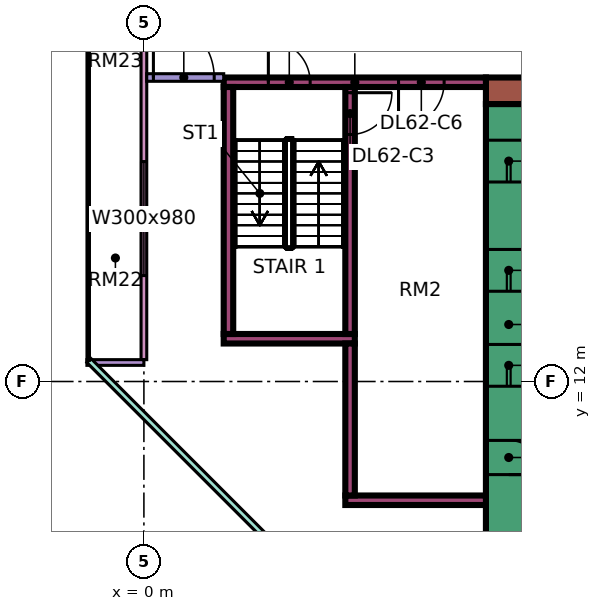
"""IFC4 building model, lengths in metres.
Left out: names, types, materials, properties, quantities, classifications, styles, units other than length and angle.
Written with IfcOpenShell. Run it as: python <this file> out.ifc"""

import sys

from ifc_helpers import new_model, si_unit, direction, frame, frame_2d, origin, place, context, subcontext, project, spatial, rectangle, extrude, element, fill, save


model = new_model("IFC4")
c1 = context("Model", 3, precision=1e-05, world=origin(), true_north=direction((0.0, 1.0)))
c2 = subcontext(c1, "Body", "Model", "MODEL_VIEW")
j1 = project(units=[si_unit("LENGTHUNIT", "METRE"), si_unit("PLANEANGLEUNIT", "RADIAN")], contexts=[c1])
p1 = place(None, origin())
s1 = spatial("IfcSite", under=j1, at=p1, CompositionType="ELEMENT")
p2 = place(p1, origin())
s2 = spatial("IfcBuilding", under=s1, at=p2, CompositionType="ELEMENT")
p3 = place(p2, frame((0.0, 0.0, 262.15)))
s3 = spatial("IfcBuildingStorey", under=s2, at=p3, CompositionType="ELEMENT", Elevation=262.15)
p4 = place(p3, frame((9.0, 19.65, 0.0), z_axis=(0.0, 0.0, 1.0), x_axis=(1.0, 0.0, 0.0)))
e1 = element("IfcWall", 1, at=p4, inside=s3, PredefinedType="SHEAR", context=c2, shape_type="SweptSolid", body=[
    extrude(rectangle(XDim=25.0, YDim=0.7, at=frame_2d((12.5, 0.0))), origin(), (0.0, 0.0, 1.0), 11.25),
])
p5 = place(p4, frame((19.1, 0.0, 0.0)))
e2 = element("IfcOpeningElement", 2, at=p5, cuts=e1, PredefinedType="OPENING", context=c2, shape_type="SweptSolid", body=[
    extrude(rectangle(XDim=1.8, YDim=2.4, at=frame_2d((0.9, 1.2))), frame((0.0, 0.36, 0.0), z_axis=(0.0, -1.0, 0.0), x_axis=(1.0, 0.0, 0.0)), (0.0, 0.0, 1.0), 0.72),
])
p6 = place(p3, frame((9.6, 7.7, 0.0), z_axis=(0.0, 0.0, 1.0), x_axis=(0.0, 1.0, 0.0)))
e3 = element("IfcWall", 3, at=p6, inside=s3, PredefinedType="SHEAR", context=c2, shape_type="SweptSolid", body=[
    extrude(rectangle(XDim=11.6, YDim=1.2, at=frame_2d((5.8, 0.0))), origin(), (0.0, 0.0, 1.0), 11.25),
])
p7 = place(p6, frame((4.175, 0.0, 0.0)))
e4 = element("IfcOpeningElement", 4, at=p7, cuts=e3, PredefinedType="OPENING", context=c2, shape_type="SweptSolid", body=[
    extrude(rectangle(XDim=1.1, YDim=2.2, at=frame_2d((0.55, 1.1))), frame((0.0, 0.61, 0.0), z_axis=(0.0, -1.0, 0.0), x_axis=(1.0, 0.0, 0.0)), (0.0, 0.0, 1.0), 1.22),
])
p8 = place(p6, frame((6.675, 0.0, 0.0)))
e5 = element("IfcOpeningElement", 5, at=p8, cuts=e3, PredefinedType="OPENING", context=c2, shape_type="SweptSolid", body=[
    extrude(rectangle(XDim=1.1, YDim=2.2, at=frame_2d((0.55, 1.1))), frame((0.0, 0.61, 0.0), z_axis=(0.0, -1.0, 0.0), x_axis=(1.0, 0.0, 0.0)), (0.0, 0.0, 1.0), 1.22),
])
p9 = place(p6, frame((9.55, 0.0, 0.0)))
e6 = element("IfcOpeningElement", 6, at=p9, cuts=e3, PredefinedType="OPENING", context=c2, shape_type="SweptSolid", body=[
    extrude(rectangle(XDim=1.1, YDim=2.2, at=frame_2d((0.55, 1.1))), frame((0.0, 0.61, 0.0), z_axis=(0.0, -1.0, 0.0), x_axis=(1.0, 0.0, 0.0)), (0.0, 0.0, 1.0), 1.22),
])
p10 = place(p6, frame((1.85, 0.0, 0.0)))
e7 = element("IfcOpeningElement", 7, at=p10, cuts=e3, PredefinedType="OPENING", context=c2, shape_type="SweptSolid", body=[
    extrude(rectangle(XDim=0.9, YDim=2.1, at=frame_2d((0.45, 1.05))), frame((0.0, 0.61, 0.0), z_axis=(0.0, -1.0, 0.0), x_axis=(1.0, 0.0, 0.0)), (0.0, 0.0, 1.0), 1.22),
])
p11 = place(p3, frame((2.1, 19.875, 0.0), z_axis=(0.0, 0.0, 1.0), x_axis=(1.0, 0.0, 0.0)))
e8 = element("IfcWall", 8, at=p11, inside=s3, PredefinedType="SHEAR", context=c2, shape_type="SweptSolid", body=[
    extrude(rectangle(XDim=6.9, YDim=0.25, at=frame_2d((3.45, 0.0))), origin(), (0.0, 0.0, 1.0), 11.25),
])
p12 = place(p11, frame((1.175, 0.0, 0.0)))
e9 = element("IfcOpeningElement", 9, at=p12, cuts=e8, PredefinedType="OPENING", context=c2, shape_type="SweptSolid", body=[
    extrude(rectangle(XDim=1.1, YDim=2.2, at=frame_2d((0.55, 1.1))), frame((0.0, 0.135, 0.0), z_axis=(0.0, -1.0, 0.0), x_axis=(1.0, 0.0, 0.0)), (0.0, 0.0, 1.0), 0.27),
])
p13 = place(p11, frame((4.6, 0.0, 0.0)))
e10 = element("IfcOpeningElement", 10, at=p13, cuts=e8, PredefinedType="OPENING", context=c2, shape_type="SweptSolid", body=[
    extrude(rectangle(XDim=1.2, YDim=2.2, at=frame_2d((0.6, 1.1))), frame((0.0, 0.135, 0.0), z_axis=(0.0, -1.0, 0.0), x_axis=(1.0, 0.0, 0.0)), (0.0, 0.0, 1.0), 0.27),
])
p14 = place(p3, frame((2.1, 13.125, 0.0), z_axis=(0.0, 0.0, 1.0), x_axis=(1.0, 0.0, 0.0)))
e11 = element("IfcWall", 11, at=p14, inside=s3, PredefinedType="SHEAR", context=c2, shape_type="SweptSolid", body=[
    extrude(rectangle(XDim=3.45, YDim=0.25, at=frame_2d((1.725, 0.0))), origin(), (0.0, 0.0, 1.0), 11.25),
])
p15 = place(p3, frame((2.225, 13.25, 0.0), z_axis=(0.0, 0.0, 1.0), x_axis=(0.0, 1.0, 0.0)))
e12 = element("IfcWall", 12, at=p15, inside=s3, PredefinedType="SHEAR", context=c2, shape_type="SweptSolid", body=[
    extrude(rectangle(XDim=6.5, YDim=0.25, at=frame_2d((3.25, 0.0))), origin(), (0.0, 0.0, 1.0), 11.25),
])
p16 = place(p3, frame((5.425, 13.25, 0.0), z_axis=(0.0, 0.0, 1.0), x_axis=(0.0, 1.0, 0.0)))
e13 = element("IfcWall", 13, at=p16, inside=s3, PredefinedType="SHEAR", context=c2, shape_type="SweptSolid", body=[
    extrude(rectangle(XDim=6.5, YDim=0.25, at=frame_2d((3.25, 0.0))), origin(), (0.0, 0.0, 1.0), 11.25),
])
p17 = place(p16, frame((5.25, 0.0, 0.0)))
e14 = element("IfcOpeningElement", 14, at=p17, cuts=e13, PredefinedType="OPENING", context=c2, shape_type="SweptSolid", body=[
    extrude(rectangle(XDim=1.1, YDim=2.2, at=frame_2d((0.55, 1.1))), frame((0.0, 0.135, 0.0), z_axis=(0.0, -1.0, 0.0), x_axis=(1.0, 0.0, 0.0)), (0.0, 0.0, 1.0), 0.27),
])
p18 = place(p3, frame((5.3, 8.875, 0.0), z_axis=(0.0, 0.0, 1.0), x_axis=(1.0, 0.0, 0.0)))
e15 = element("IfcWall", 15, at=p18, inside=s3, PredefinedType="SHEAR", context=c2, shape_type="SweptSolid", body=[
    extrude(rectangle(XDim=3.7, YDim=0.25, at=frame_2d((1.85, 0.0))), origin(), (0.0, 0.0, 1.0), 11.25),
])
p19 = place(p3, frame((5.425, 9.0, 0.0), z_axis=(0.0, 0.0, 1.0), x_axis=(0.0, 1.0, 0.0)))
e16 = element("IfcWall", 16, at=p19, inside=s3, PredefinedType="SHEAR", context=c2, shape_type="SweptSolid", body=[
    extrude(rectangle(XDim=4.0, YDim=0.25, at=frame_2d((2.0, 0.0))), origin(), (0.0, 0.0, 1.0), 11.25),
])
p20 = place(p3, frame((0.0, 23.925, 0.0), z_axis=(0.0, 0.0, 1.0), x_axis=(0.0, -1.0, 0.0)))
e17 = element("IfcWall", 17, at=p20, inside=s3, PredefinedType="SOLIDWALL", context=c2, shape_type="SweptSolid", body=[
    extrude(rectangle(XDim=11.35, YDim=0.15, at=frame_2d((5.675, 0.0))), origin(), (0.0, 0.0, 1.0), 10.85),
])
p21 = place(p20, frame((6.137, 0.0, 0.45)))
e18 = element("IfcOpeningElement", 18, at=p21, cuts=e17, PredefinedType="OPENING", context=c2, shape_type="SweptSolid", body=[
    extrude(rectangle(XDim=3.0, YDim=9.8, at=frame_2d((1.5, 4.9))), frame((0.0, 0.085, 0.0), z_axis=(0.0, -1.0, 0.0), x_axis=(1.0, 0.0, 0.0)), (0.0, 0.0, 1.0), 0.17),
])
p22 = place(p3, frame((-1.5, 12.5, 0.0), z_axis=(0.0, 0.0, 1.0), x_axis=(1.0, 0.0, 0.0)))
e19 = element("IfcWall", 19, at=p22, inside=s3, PredefinedType="SOLIDWALL", context=c2, shape_type="SweptSolid", body=[
    extrude(rectangle(XDim=1.5, YDim=0.15, at=frame_2d((0.75, 0.0))), origin(), (0.0, 0.0, 1.0), 10.85),
])
p23 = place(p3, frame((-1.447, 12.553, 0.0), z_axis=(0.0, 0.0, 1.0), x_axis=(0.707106781187, -0.707106781187, 0.0)))
e20 = element("IfcWall", 20, at=p23, inside=s3, PredefinedType="SOLIDWALL", context=c2, shape_type="SweptSolid", body=[
    extrude(rectangle(XDim=19.799, YDim=0.15, at=frame_2d((9.899, 0.0))), origin(), (0.0, 0.0, 1.0), 10.85),
])
p24 = place(p23, frame((8.399, 0.0, 0.45)))
e21 = element("IfcOpeningElement", 21, at=p24, cuts=e20, PredefinedType="OPENING", context=c2, shape_type="SweptSolid", body=[
    extrude(rectangle(XDim=3.0, YDim=9.8, at=frame_2d((1.5, 4.9))), frame((0.0, 0.085, 0.0), z_axis=(0.0, -1.0, 0.0), x_axis=(1.0, 0.0, 0.0)), (0.0, 0.0, 1.0), 0.17),
])
p25 = place(p3, frame((0.074, 20.0, 0.0), z_axis=(0.0, 0.0, 1.0), x_axis=(1.0, 0.0, 0.0)))
e22 = element("IfcWall", 22, at=p25, inside=s3, PredefinedType="PARTITIONING", context=c2, shape_type="SweptSolid", body=[
    extrude(rectangle(XDim=2.026, YDim=0.2, at=frame_2d((1.013, 0.0))), origin(), (0.0, 0.0, 1.0), 10.85),
])
p26 = place(p25, frame((0.176, 0.0, 0.0)))
e23 = element("IfcOpeningElement", 23, at=p26, cuts=e22, PredefinedType="OPENING", context=c2, shape_type="SweptSolid", body=[
    extrude(rectangle(XDim=1.6, YDim=2.1, at=frame_2d((0.8, 1.05))), frame((0.0, 0.11, 0.0), z_axis=(0.0, -1.0, 0.0), x_axis=(1.0, 0.0, 0.0)), (0.0, 0.0, 1.0), 0.22),
])
p27 = place(p21, origin())
e24 = element("IfcWindow", 24, at=p27, inside=s3, PartitioningType="SINGLE_PANEL", PredefinedType="WINDOW", context=c2, shape_type="SweptSolid", body=[
    extrude(rectangle(XDim=3.0, YDim=9.8, at=frame_2d((1.5, 4.9))), frame((0.0, 0.03, 0.0), z_axis=(0.0, -1.0, 0.0), x_axis=(1.0, 0.0, 0.0)), (0.0, 0.0, 1.0), 0.06),
])
fill(e18, e24)
p28 = place(p7, origin())
e25 = element("IfcDoor", 25, at=p28, inside=s3, OperationType="DOUBLE_DOOR_SLIDING", PredefinedType="DOOR", context=c2, shape_type="SweptSolid", body=[
    extrude(rectangle(XDim=1.1, YDim=2.2, at=frame_2d((0.55, 1.1))), frame((0.0, 0.025, 0.0), z_axis=(0.0, -1.0, 0.0), x_axis=(1.0, 0.0, 0.0)), (0.0, 0.0, 1.0), 0.05),
])
fill(e4, e25)
p29 = place(p8, origin())
e26 = element("IfcDoor", 26, at=p29, inside=s3, OperationType="DOUBLE_DOOR_SLIDING", PredefinedType="DOOR", context=c2, shape_type="SweptSolid", body=[
    extrude(rectangle(XDim=1.1, YDim=2.2, at=frame_2d((0.55, 1.1))), frame((0.0, 0.025, 0.0), z_axis=(0.0, -1.0, 0.0), x_axis=(1.0, 0.0, 0.0)), (0.0, 0.0, 1.0), 0.05),
])
fill(e5, e26)
p30 = place(p9, origin())
e27 = element("IfcDoor", 27, at=p30, inside=s3, OperationType="DOUBLE_DOOR_SLIDING", PredefinedType="DOOR", context=c2, shape_type="SweptSolid", body=[
    extrude(rectangle(XDim=1.1, YDim=2.2, at=frame_2d((0.55, 1.1))), frame((0.0, 0.025, 0.0), z_axis=(0.0, -1.0, 0.0), x_axis=(1.0, 0.0, 0.0)), (0.0, 0.0, 1.0), 0.05),
])
fill(e6, e27)
p31 = place(p17, origin())
e28 = element("IfcDoor", 28, at=p31, inside=s3, OperationType="SINGLE_SWING_RIGHT", PredefinedType="DOOR", context=c2, shape_type="SweptSolid", body=[
    extrude(rectangle(XDim=1.1, YDim=2.2, at=frame_2d((0.55, 1.1))), frame((0.0, 0.025, 0.0), z_axis=(0.0, -1.0, 0.0), x_axis=(1.0, 0.0, 0.0)), (0.0, 0.0, 1.0), 0.05),
])
fill(e14, e28)
p32 = place(p10, frame((0.9, 0.0, 0.0), z_axis=(0.0, 0.0, 1.0), x_axis=(-1.0, 0.0, 0.0)))
e29 = element("IfcDoor", 29, at=p32, inside=s3, OperationType="SINGLE_SWING_LEFT", PredefinedType="DOOR", context=c2, shape_type="SweptSolid", body=[
    extrude(rectangle(XDim=0.9, YDim=2.1, at=frame_2d((0.45, 1.05))), frame((0.0, 0.025, 0.0), z_axis=(0.0, -1.0, 0.0), x_axis=(1.0, 0.0, 0.0)), (0.0, 0.0, 1.0), 0.05),
])
fill(e7, e29)
p33 = place(p12, origin())
e30 = element("IfcDoor", 30, at=p33, inside=s3, OperationType="SINGLE_SWING_LEFT", PredefinedType="DOOR", context=c2, shape_type="SweptSolid", body=[
    extrude(rectangle(XDim=1.1, YDim=2.2, at=frame_2d((0.55, 1.1))), frame((0.0, 0.025, 0.0), z_axis=(0.0, -1.0, 0.0), x_axis=(1.0, 0.0, 0.0)), (0.0, 0.0, 1.0), 0.05),
])
fill(e9, e30)
p34 = place(p13, frame((1.2, 0.0, 0.0), z_axis=(0.0, 0.0, 1.0), x_axis=(-1.0, 0.0, 0.0)))
e31 = element("IfcDoor", 31, at=p34, inside=s3, OperationType="SINGLE_SWING_LEFT", PredefinedType="DOOR", context=c2, shape_type="SweptSolid", body=[
    extrude(rectangle(XDim=1.2, YDim=2.2, at=frame_2d((0.6, 1.1))), frame((0.0, 0.025, 0.0), z_axis=(0.0, -1.0, 0.0), x_axis=(1.0, 0.0, 0.0)), (0.0, 0.0, 1.0), 0.05),
])
fill(e10, e31)
p35 = place(p26, origin())
e32 = element("IfcDoor", 32, at=p35, inside=s3, OperationType="DOUBLE_DOOR_SINGLE_SWING", PredefinedType="DOOR", context=c2, shape_type="SweptSolid", body=[
    extrude(rectangle(XDim=1.6, YDim=2.1, at=frame_2d((0.8, 1.05))), frame((0.0, 0.025, 0.0), z_axis=(0.0, -1.0, 0.0), x_axis=(1.0, 0.0, 0.0)), (0.0, 0.0, 1.0), 0.05),
])
fill(e23, e32)
save(model, sys.argv[1])
